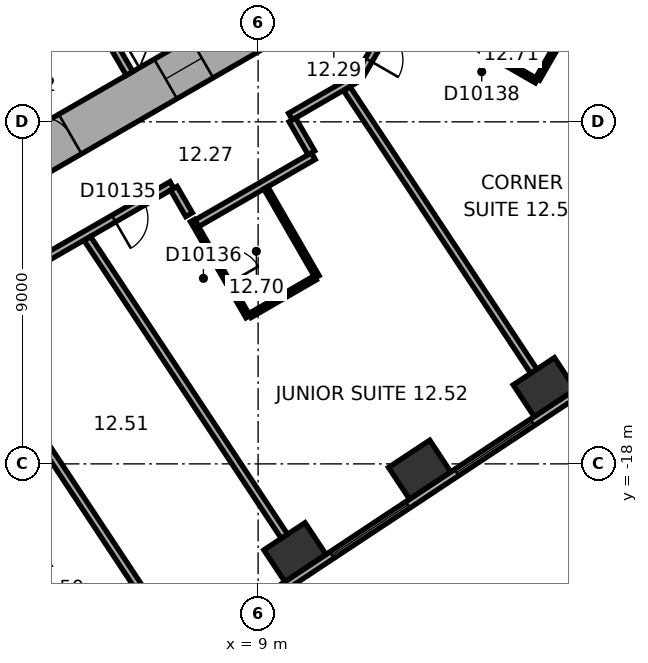
"""IFC4 building model, lengths in metres.
Left out: names, types, materials, properties, quantities, classifications, styles, units other than length and angle.
Written with IfcOpenShell. Run it as: python <this file> out.ifc"""

import sys

from ifc_helpers import new_model, si_unit, direction, frame, frame_2d, origin, origin_2d, place, context, subcontext, project, spatial, rectangle, extrude, element, fill, save


model = new_model("IFC4")
c1 = context("Model", 3, precision=1e-05, world=origin(), true_north=direction((0.0, 1.0)))
c2 = subcontext(c1, "Body", "Model", "MODEL_VIEW")
j1 = project(units=[si_unit("LENGTHUNIT", "METRE"), si_unit("PLANEANGLEUNIT", "RADIAN")], contexts=[c1])
p1 = place(None, origin())
s1 = spatial("IfcSite", under=j1, at=p1, CompositionType="ELEMENT")
p2 = place(p1, origin())
s2 = spatial("IfcBuilding", under=s1, at=p2, CompositionType="ELEMENT")
p3 = place(p2, frame((0.0, 0.0, 60.5)))
s3 = spatial("IfcBuildingStorey", under=s2, at=p3, CompositionType="ELEMENT", Elevation=60.5)
for number, where, z_axis, x_axis in (
    (1, (9.969, -20.324, 0.0), (0.0, 0.0, 1.0), (0.834, 0.552, 0.0)),
    (2, (13.25, -18.152, 0.0), (0.0, 0.0, 1.0), (0.834, 0.552, 0.0)),
    (3, (16.531, -15.981, 0.0), (0.0, 0.0, 1.0), (0.834, 0.552, 0.0)),
):
    element("IfcColumn", number, at=place(p3, frame(where, z_axis=z_axis, x_axis=x_axis)), inside=s3, PredefinedType="COLUMN", context=c2, shape_type="SweptSolid", body=[
        extrude(rectangle(XDim=1.3, YDim=1.0, at=origin_2d()), origin(), (0.0, 0.0, 1.0), 3.3),
    ])
p4 = place(p3, frame((-0.3, -11.836, 0.0), z_axis=(0.0, 0.0, 1.0), x_axis=(0.866021384402, 0.500006961711, 0.0)))
e4 = element("IfcWall", 4, at=p4, inside=s3, PredefinedType="SHEAR", context=c2, shape_type="SweptSolid", body=[
    extrude(rectangle(XDim=12.355, YDim=1.2, at=frame_2d((6.178, 0.0))), origin(), (0.0, 0.0, 1.0), 3.3),
])
p5 = place(p4, frame((4.128, 0.0, 0.0)))
e5 = element("IfcOpeningElement", 5, at=p5, cuts=e4, PredefinedType="OPENING", context=c2, shape_type="SweptSolid", body=[
    extrude(rectangle(XDim=0.9, YDim=2.1, at=frame_2d((0.45, 1.05))), frame((0.0, 0.61, 0.0), z_axis=(0.0, -1.0, 0.0), x_axis=(1.0, 0.0, 0.0)), (0.0, 0.0, 1.0), 1.22),
])
p6 = place(p4, frame((7.928, 0.0, 0.0)))
e6 = element("IfcOpeningElement", 6, at=p6, cuts=e4, PredefinedType="OPENING", context=c2, shape_type="SweptSolid", body=[
    extrude(rectangle(XDim=1.1, YDim=2.1, at=frame_2d((0.55, 1.05))), frame((0.0, 0.61, 0.0), z_axis=(0.0, -1.0, 0.0), x_axis=(1.0, 0.0, 0.0)), (0.0, 0.0, 1.0), 1.22),
])
p7 = place(p3, frame((3.083, -25.601, 0.0), z_axis=(0.0, 0.0, 1.0), x_axis=(0.833884295743, 0.551939291329, 0.0)))
e7 = element("IfcWall", 7, at=p7, inside=s3, PredefinedType="STANDARD", context=c2, shape_type="SweptSolid", body=[
    extrude(rectangle(XDim=21.246, YDim=0.2, at=frame_2d((10.623, 0.0))), origin(), (0.0, 0.0, 1.0), 3.3),
])
p8 = place(p7, frame((1.553, 0.0, 0.8)))
e8 = element("IfcOpeningElement", 8, at=p8, cuts=e7, PredefinedType="OPENING", context=c2, shape_type="SweptSolid", body=[
    extrude(rectangle(XDim=2.4, YDim=1.7, at=frame_2d((1.2, 0.85))), frame((0.0, 0.11, 0.0), z_axis=(0.0, -1.0, 0.0), x_axis=(1.0, 0.0, 0.0)), (0.0, 0.0, 1.0), 0.22),
])
p9 = place(p7, frame((5.488, 0.0, 0.8)))
e9 = element("IfcOpeningElement", 9, at=p9, cuts=e7, PredefinedType="OPENING", context=c2, shape_type="SweptSolid", body=[
    extrude(rectangle(XDim=2.4, YDim=1.7, at=frame_2d((1.2, 0.85))), frame((0.0, 0.11, 0.0), z_axis=(0.0, -1.0, 0.0), x_axis=(1.0, 0.0, 0.0)), (0.0, 0.0, 1.0), 0.22),
])
p10 = place(p7, frame((9.422, 0.0, 0.8)))
e10 = element("IfcOpeningElement", 10, at=p10, cuts=e7, PredefinedType="OPENING", context=c2, shape_type="SweptSolid", body=[
    extrude(rectangle(XDim=2.4, YDim=1.7, at=frame_2d((1.2, 0.85))), frame((0.0, 0.11, 0.0), z_axis=(0.0, -1.0, 0.0), x_axis=(1.0, 0.0, 0.0)), (0.0, 0.0, 1.0), 0.22),
])
p11 = place(p7, frame((13.357, 0.0, 0.8)))
e11 = element("IfcOpeningElement", 11, at=p11, cuts=e7, PredefinedType="OPENING", context=c2, shape_type="SweptSolid", body=[
    extrude(rectangle(XDim=2.4, YDim=1.7, at=frame_2d((1.2, 0.85))), frame((0.0, 0.11, 0.0), z_axis=(0.0, -1.0, 0.0), x_axis=(1.0, 0.0, 0.0)), (0.0, 0.0, 1.0), 0.22),
])
p12 = place(p7, frame((17.291, 0.0, 0.8)))
e12 = element("IfcOpeningElement", 12, at=p12, cuts=e7, PredefinedType="OPENING", context=c2, shape_type="SweptSolid", body=[
    extrude(rectangle(XDim=2.4, YDim=1.7, at=frame_2d((1.2, 0.85))), frame((0.0, 0.11, 0.0), z_axis=(0.0, -1.0, 0.0), x_axis=(1.0, 0.0, 0.0)), (0.0, 0.0, 1.0), 0.22),
])
p13 = place(p3, frame((-0.024, -8.559, 0.0), z_axis=(0.0, 0.0, 1.0), x_axis=(0.866026010844, 0.49999894854, 0.0)))
e13 = element("IfcWall", 13, at=p13, inside=s3, PredefinedType="PARTITIONING", context=c2, shape_type="SweptSolid", body=[
    extrude(rectangle(XDim=8.0, YDim=0.2, at=frame_2d((4.0, 0.0))), origin(), (0.0, 0.0, 1.0), 3.05),
])
p14 = place(p3, frame((4.516, -5.822, 0.0), z_axis=(0.0, 0.0, 1.0), x_axis=(0.499946605688, -0.86605622881, 0.0)))
e14 = element("IfcWall", 14, at=p14, inside=s3, PredefinedType="PARTITIONING", context=c2, shape_type="SweptSolid", body=[
    extrude(rectangle(XDim=2.2, YDim=0.2, at=frame_2d((1.1, 0.0))), origin(), (0.0, 0.0, 1.0), 3.05),
])
p15 = place(p3, frame((0.847, -7.767, 0.0), z_axis=(0.0, 0.0, 1.0), x_axis=(0.866027801685, 0.499995846692, 0.0)))
e15 = element("IfcWall", 15, at=p15, inside=s3, PredefinedType="SHEAR", context=c2, shape_type="SweptSolid", body=[
    extrude(rectangle(XDim=7.06, YDim=0.3, at=frame_2d((3.53, 0.0))), origin(), (0.0, 0.0, 1.0), 3.05),
])
p16 = place(p3, frame((1.033, -13.953, 0.0), z_axis=(0.0, 0.0, 1.0), x_axis=(0.866017531406, 0.500013635111, 0.0)))
e16 = element("IfcWall", 16, at=p16, inside=s3, PredefinedType="PARTITIONING", context=c2, shape_type="SweptSolid", body=[
    extrude(rectangle(XDim=6.58, YDim=0.2, at=frame_2d((3.29, 0.0))), origin(), (0.0, 0.0, 1.0), 3.05),
])
p17 = place(p16, frame((1.521, 0.0, 0.0)))
e17 = element("IfcOpeningElement", 17, at=p17, cuts=e16, PredefinedType="OPENING", context=c2, shape_type="SweptSolid", body=[
    extrude(rectangle(XDim=0.9, YDim=2.1, at=frame_2d((0.45, 1.05))), frame((0.0, 0.11, 0.0), z_axis=(0.0, -1.0, 0.0), x_axis=(1.0, 0.0, 0.0)), (0.0, 0.0, 1.0), 0.22),
])
p18 = place(p16, frame((4.811, 0.0, 0.0)))
e18 = element("IfcOpeningElement", 18, at=p18, cuts=e16, PredefinedType="OPENING", context=c2, shape_type="SweptSolid", body=[
    extrude(rectangle(XDim=0.9, YDim=2.1, at=frame_2d((0.45, 1.05))), frame((0.0, 0.11, 0.0), z_axis=(0.0, -1.0, 0.0), x_axis=(1.0, 0.0, 0.0)), (0.0, 0.0, 1.0), 0.22),
])
p19 = place(p3, frame((6.412, -22.079, 0.0), z_axis=(0.0, 0.0, 1.0), x_axis=(-0.551919507115, 0.83389739037, 0.0)))
e19 = element("IfcWall", 19, at=p19, inside=s3, PredefinedType="PARTITIONING", context=c2, shape_type="SweptSolid", body=[
    extrude(rectangle(XDim=9.635, YDim=0.2, at=frame_2d((4.817, 0.0))), origin(), (0.0, 0.0, 1.0), 3.05),
])
p20 = place(p3, frame((6.782, -10.749, 0.0), z_axis=(0.0, 0.0, 1.0), x_axis=(0.500170954823, -0.865926680471, 0.0)))
e20 = element("IfcWall", 20, at=p20, inside=s3, PredefinedType="PARTITIONING", context=c2, shape_type="SweptSolid", body=[
    extrude(rectangle(XDim=0.801, YDim=0.2, at=frame_2d((0.4, 0.0))), origin(), (0.0, 0.0, 1.0), 3.05),
])
p21 = place(p3, frame((7.385, -11.673, 0.0), z_axis=(0.0, 0.0, 1.0), x_axis=(0.866037524642, 0.499979005472, 0.0)))
e21 = element("IfcWall", 21, at=p21, inside=s3, PredefinedType="PARTITIONING", context=c2, shape_type="SweptSolid", body=[
    extrude(rectangle(XDim=3.542, YDim=0.2, at=frame_2d((1.771, 0.0))), origin(), (0.0, 0.0, 1.0), 3.05),
])
p22 = place(p3, frame((8.733, -14.127, 0.0), z_axis=(0.0, 0.0, 1.0), x_axis=(-0.499978132246, 0.86603802877, 0.0)))
e22 = element("IfcWall", 22, at=p22, inside=s3, PredefinedType="PARTITIONING", context=c2, shape_type="SweptSolid", body=[
    extrude(rectangle(XDim=2.921, YDim=0.12, at=frame_2d((1.46, 0.0))), origin(), (0.0, 0.0, 1.0), 3.05),
])
p23 = place(p22, frame((1.01, 0.0, 0.0)))
e23 = element("IfcOpeningElement", 23, at=p23, cuts=e22, PredefinedType="OPENING", context=c2, shape_type="SweptSolid", body=[
    extrude(rectangle(XDim=0.9, YDim=2.1, at=frame_2d((0.45, 1.05))), frame((0.0, 0.07, 0.0), z_axis=(0.0, -1.0, 0.0), x_axis=(1.0, 0.0, 0.0)), (0.0, 0.0, 1.0), 0.14),
])
p24 = place(p3, frame((9.203, -10.738, 0.0), z_axis=(0.0, 0.0, 1.0), x_axis=(0.50000943426, -0.866019956843, 0.0)))
e24 = element("IfcWall", 24, at=p24, inside=s3, PredefinedType="PARTITIONING", context=c2, shape_type="SweptSolid", body=[
    extrude(rectangle(XDim=2.7, YDim=0.12, at=frame_2d((1.35, 0.0))), origin(), (0.0, 0.0, 1.0), 3.05),
])
p25 = place(p3, frame((9.693, -19.907, 0.0), z_axis=(0.0, 0.0, 1.0), x_axis=(-0.551938394837, 0.833884889121, 0.0)))
e25 = element("IfcWall", 25, at=p25, inside=s3, PredefinedType="PARTITIONING", context=c2, shape_type="SweptSolid", body=[
    extrude(rectangle(XDim=9.394, YDim=0.2, at=frame_2d((4.697, 0.0))), origin(), (0.0, 0.0, 1.0), 2.6),
])
p26 = place(p3, frame((9.852, -8.861, 0.0), z_axis=(0.0, 0.0, 1.0), x_axis=(0.866013291437, 0.500020978615, 0.0)))
e26 = element("IfcWall", 26, at=p26, inside=s3, PredefinedType="PARTITIONING", context=c2, shape_type="SweptSolid", body=[
    extrude(rectangle(XDim=2.077, YDim=0.2, at=frame_2d((1.038, 0.0))), origin(), (0.0, 0.0, 1.0), 3.05),
])
p27 = place(p3, frame((10.402, -9.815, 0.0), z_axis=(0.0, 0.0, 1.0), x_axis=(-0.499968756647, 0.866043441391, 0.0)))
e27 = element("IfcWall", 27, at=p27, inside=s3, PredefinedType="PARTITIONING", context=c2, shape_type="SweptSolid", body=[
    extrude(rectangle(XDim=1.001, YDim=0.2, at=frame_2d((0.5, 0.0))), origin(), (0.0, 0.0, 1.0), 3.05),
])
p28 = place(p3, frame((10.501, -13.106, 0.0), z_axis=(0.0, 0.0, 1.0), x_axis=(-0.866013262469, -0.500021028785, 0.0)))
e28 = element("IfcWall", 28, at=p28, inside=s3, PredefinedType="PARTITIONING", context=c2, shape_type="SweptSolid", body=[
    extrude(rectangle(XDim=1.982, YDim=0.12, at=frame_2d((0.991, 0.0))), origin(), (0.0, 0.0, 1.0), 3.05),
])
p29 = place(p3, frame((11.67, -7.788, 0.0), z_axis=(0.0, 0.0, 1.0), x_axis=(0.500063286585, 0.865988862174, 0.0)))
e29 = element("IfcWall", 29, at=p29, inside=s3, PredefinedType="PARTITIONING", context=c2, shape_type="SweptSolid", body=[
    extrude(rectangle(XDim=1.86, YDim=0.2, at=frame_2d((0.93, 0.0))), origin(), (0.0, 0.0, 1.0), 3.05),
])
p30 = place(p29, frame((0.48, 0.0, 0.0)))
e30 = element("IfcOpeningElement", 30, at=p30, cuts=e29, PredefinedType="OPENING", context=c2, shape_type="SweptSolid", body=[
    extrude(rectangle(XDim=0.9, YDim=2.1, at=frame_2d((0.45, 1.05))), frame((0.0, 0.11, 0.0), z_axis=(0.0, -1.0, 0.0), x_axis=(1.0, 0.0, 0.0)), (0.0, 0.0, 1.0), 0.22),
])
p31 = place(p3, frame((16.255, -15.564, 0.0), z_axis=(0.0, 0.0, 1.0), x_axis=(-0.55192208744, 0.833895682562, 0.0)))
e31 = element("IfcWall", 31, at=p31, inside=s3, PredefinedType="PARTITIONING", context=c2, shape_type="SweptSolid", body=[
    extrude(rectangle(XDim=8.913, YDim=0.2, at=frame_2d((4.457, 0.0))), origin(), (0.0, 0.0, 1.0), 2.6),
])
p32 = place(p3, frame((16.326, -7.925, 0.0), z_axis=(0.0, 0.0, 1.0), x_axis=(-0.865997131366, 0.500048966069, 0.0)))
e32 = element("IfcWall", 32, at=p32, inside=s3, PredefinedType="PARTITIONING", context=c2, shape_type="SweptSolid", body=[
    extrude(rectangle(XDim=2.74, YDim=0.12, at=frame_2d((1.37, 0.0))), origin(), (0.0, 0.0, 1.0), 3.05),
])
p33 = place(p32, frame((0.92, 0.0, 0.0)))
e33 = element("IfcOpeningElement", 33, at=p33, cuts=e32, PredefinedType="OPENING", context=c2, shape_type="SweptSolid", body=[
    extrude(rectangle(XDim=0.9, YDim=2.1, at=frame_2d((0.45, 1.05))), frame((0.0, 0.07, 0.0), z_axis=(0.0, -1.0, 0.0), x_axis=(1.0, 0.0, 0.0)), (0.0, 0.0, 1.0), 0.14),
])
p34 = place(p3, frame((17.396, -6.071, 0.0), z_axis=(0.0, 0.0, 1.0), x_axis=(-0.500027264788, -0.866009661879, 0.0)))
e34 = element("IfcWall", 34, at=p34, inside=s3, PredefinedType="PARTITIONING", context=c2, shape_type="SweptSolid", body=[
    extrude(rectangle(XDim=2.08, YDim=0.12, at=frame_2d((1.04, 0.0))), origin(), (0.0, 0.0, 1.0), 3.05),
])
p35 = place(p10, origin())
e35 = element("IfcWindow", 35, at=p35, inside=s3, PartitioningType="SINGLE_PANEL", PredefinedType="WINDOW", context=c2, shape_type="SweptSolid", body=[
    extrude(rectangle(XDim=2.4, YDim=1.7, at=frame_2d((1.2, 0.85))), frame((0.0, 0.03, 0.0), z_axis=(0.0, -1.0, 0.0), x_axis=(1.0, 0.0, 0.0)), (0.0, 0.0, 1.0), 0.06),
])
fill(e10, e35)
p36 = place(p11, origin())
e36 = element("IfcWindow", 36, at=p36, inside=s3, PartitioningType="SINGLE_PANEL", PredefinedType="WINDOW", context=c2, shape_type="SweptSolid", body=[
    extrude(rectangle(XDim=2.4, YDim=1.7, at=frame_2d((1.2, 0.85))), frame((0.0, 0.03, 0.0), z_axis=(0.0, -1.0, 0.0), x_axis=(1.0, 0.0, 0.0)), (0.0, 0.0, 1.0), 0.06),
])
fill(e11, e36)
p37 = place(p5, origin())
e37 = element("IfcDoor", 37, at=p37, inside=s3, OperationType="SINGLE_SWING_LEFT", PredefinedType="DOOR", context=c2, shape_type="SweptSolid", body=[
    extrude(rectangle(XDim=0.9, YDim=2.1, at=frame_2d((0.45, 1.05))), frame((0.0, 0.025, 0.0), z_axis=(0.0, -1.0, 0.0), x_axis=(1.0, 0.0, 0.0)), (0.0, 0.0, 1.0), 0.05),
])
fill(e5, e37)
p38 = place(p6, origin())
e38 = element("IfcDoor", 38, at=p38, inside=s3, OperationType="DOUBLE_DOOR_SLIDING", PredefinedType="DOOR", context=c2, shape_type="SweptSolid", body=[
    extrude(rectangle(XDim=1.1, YDim=2.1, at=frame_2d((0.55, 1.05))), frame((0.0, 0.025, 0.0), z_axis=(0.0, -1.0, 0.0), x_axis=(1.0, 0.0, 0.0)), (0.0, 0.0, 1.0), 0.05),
])
fill(e6, e38)
p39 = place(p18, origin())
e39 = element("IfcDoor", 39, at=p39, inside=s3, OperationType="SINGLE_SWING_LEFT", PredefinedType="DOOR", context=c2, shape_type="SweptSolid", body=[
    extrude(rectangle(XDim=0.9, YDim=2.1, at=frame_2d((0.45, 1.05))), frame((0.0, 0.025, 0.0), z_axis=(0.0, -1.0, 0.0), x_axis=(1.0, 0.0, 0.0)), (0.0, 0.0, 1.0), 0.05),
])
fill(e18, e39)
p40 = place(p23, origin())
e40 = element("IfcDoor", 40, at=p40, inside=s3, OperationType="SINGLE_SWING_LEFT", PredefinedType="DOOR", context=c2, shape_type="SweptSolid", body=[
    extrude(rectangle(XDim=0.9, YDim=2.1, at=frame_2d((0.45, 1.05))), frame((0.0, 0.025, 0.0), z_axis=(0.0, -1.0, 0.0), x_axis=(1.0, 0.0, 0.0)), (0.0, 0.0, 1.0), 0.05),
])
fill(e23, e40)
p41 = place(p30, origin())
e41 = element("IfcDoor", 41, at=p41, inside=s3, OperationType="SINGLE_SWING_LEFT", PredefinedType="DOOR", context=c2, shape_type="SweptSolid", body=[
    extrude(rectangle(XDim=0.9, YDim=2.1, at=frame_2d((0.45, 1.05))), frame((0.0, 0.025, 0.0), z_axis=(0.0, -1.0, 0.0), x_axis=(1.0, 0.0, 0.0)), (0.0, 0.0, 1.0), 0.05),
])
fill(e30, e41)
p42 = place(p33, origin())
e42 = element("IfcDoor", 42, at=p42, inside=s3, OperationType="SINGLE_SWING_LEFT", PredefinedType="DOOR", context=c2, shape_type="SweptSolid", body=[
    extrude(rectangle(XDim=0.9, YDim=2.1, at=frame_2d((0.45, 1.05))), frame((0.0, 0.025, 0.0), z_axis=(0.0, -1.0, 0.0), x_axis=(1.0, 0.0, 0.0)), (0.0, 0.0, 1.0), 0.05),
])
fill(e33, e42)
save(model, sys.argv[1])
